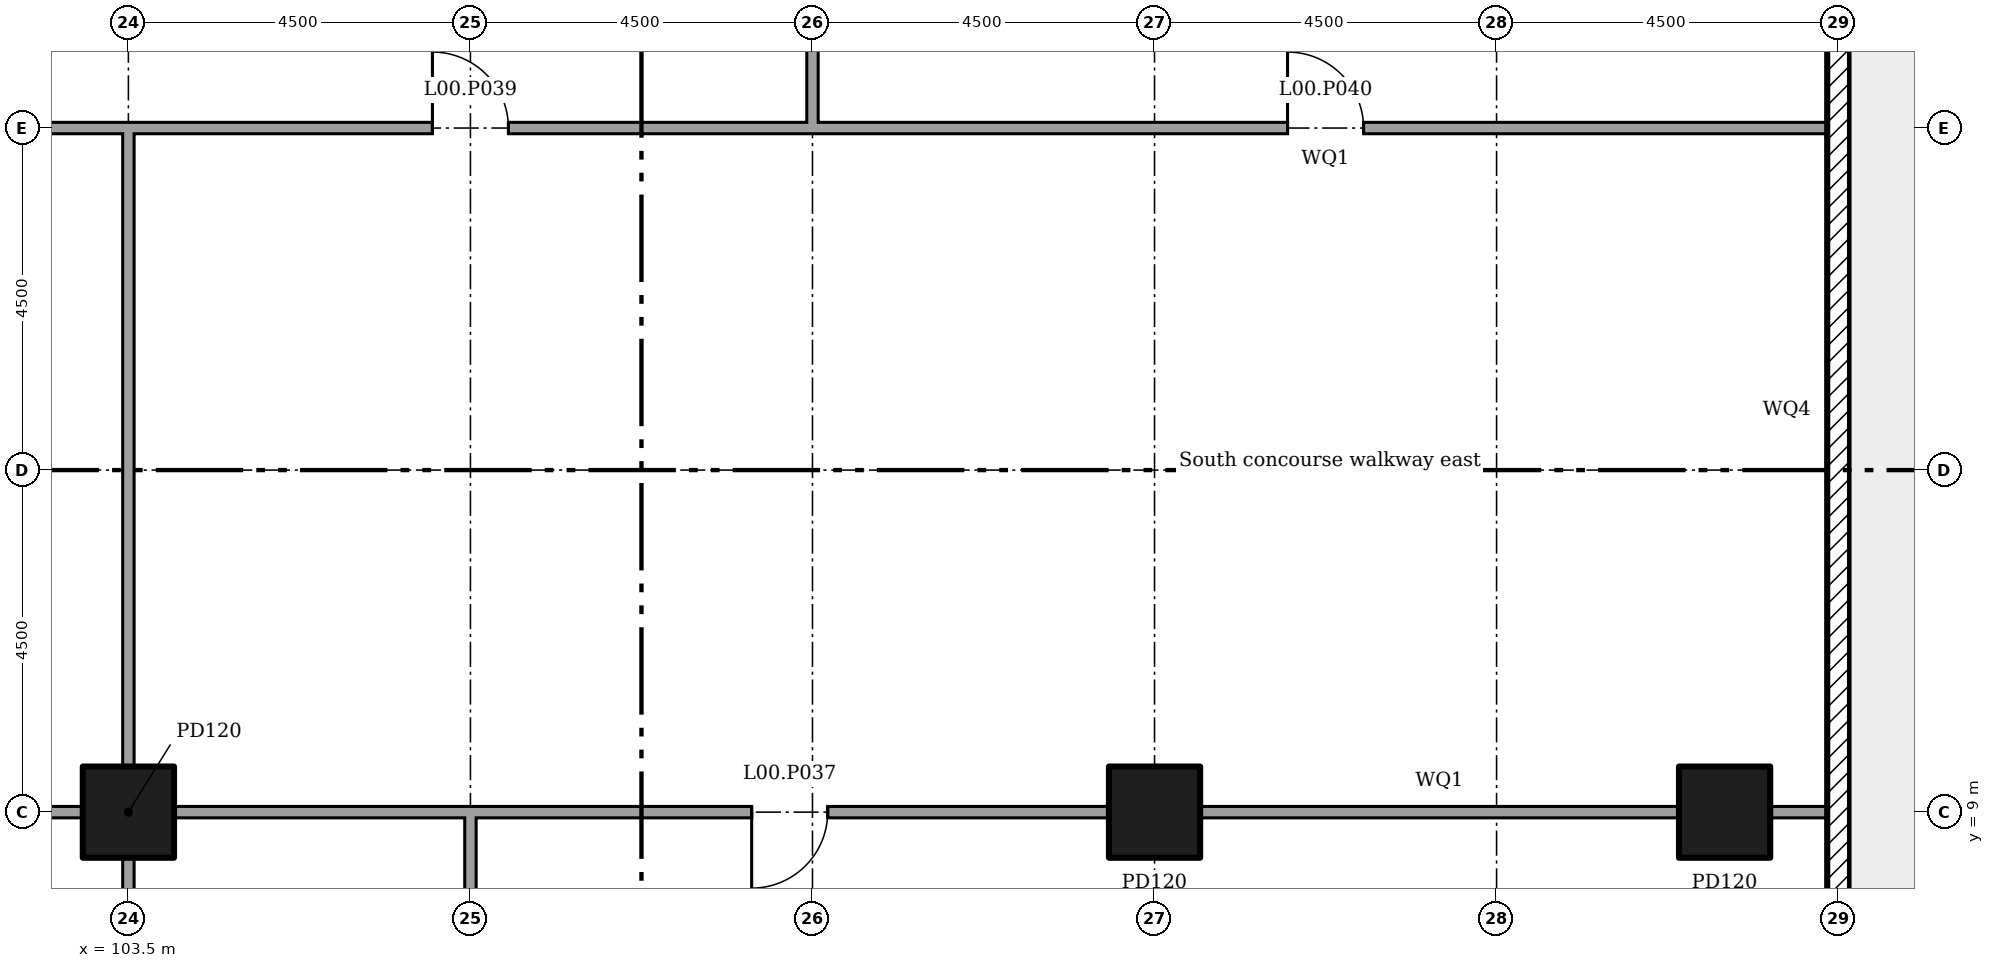
"""IFC4 building model, lengths in metres.
Left out: names, types, materials, properties, quantities, classifications, styles, units other than length and angle.
Written with IfcOpenShell. Run it as: python <this file> out.ifc"""

import sys

from ifc_helpers import new_model, si_unit, direction, frame, frame_2d, origin, origin_2d, place, context, subcontext, project, spatial, rectangle, extrude, element, fill, save


model = new_model("IFC4")
c1 = context("Model", 3, precision=1e-05, world=origin(), true_north=direction((0.0, 1.0)))
c2 = subcontext(c1, "Body", "Model", "MODEL_VIEW")
j1 = project(units=[si_unit("LENGTHUNIT", "METRE"), si_unit("PLANEANGLEUNIT", "RADIAN")], contexts=[c1])
p1 = place(None, origin())
s1 = spatial("IfcSite", under=j1, at=p1, CompositionType="ELEMENT")
p2 = place(p1, origin())
s2 = spatial("IfcBuilding", under=s1, at=p2, CompositionType="ELEMENT")
p3 = place(p2, origin())
s3 = spatial("IfcBuildingStorey", under=s2, at=p3, CompositionType="ELEMENT", Elevation=0.0)
for number, where in (
    (1, (103.5, 9.0, 0.0)),
    (2, (117.0, 9.0, 0.0)),
    (3, (124.5, 9.0, 0.0)),
):
    element("IfcColumn", number, at=place(p3, frame(where)), inside=s3, PredefinedType="COLUMN", context=c2, shape_type="SweptSolid", body=[
        extrude(rectangle(XDim=1.2, YDim=1.2, at=origin_2d()), origin(), (0.0, 0.0, 1.0), 6.0),
    ])
p4 = place(p3, frame((103.5, 0.595, 0.0), z_axis=(0.0, 0.0, 1.0), x_axis=(0.0, 1.0, 0.0)))
e4 = element("IfcWall", 4, at=p4, inside=s3, PredefinedType="PARTITIONING", context=c2, shape_type="SweptSolid", body=[
    extrude(rectangle(XDim=7.81, YDim=0.15, at=frame_2d((3.905, 0.0))), origin(), (0.0, 0.0, 1.0), 5.55),
])
p5 = place(p4, frame((3.4, 0.0, 0.0)))
e5 = element("IfcOpeningElement", 5, at=p5, cuts=e4, PredefinedType="OPENING", context=c2, shape_type="SweptSolid", body=[
    extrude(rectangle(XDim=1.0, YDim=2.1, at=frame_2d((0.5, 1.05))), frame((0.0, 0.085, 0.0), z_axis=(0.0, -1.0, 0.0), x_axis=(1.0, 0.0, 0.0)), (0.0, 0.0, 1.0), 0.17),
])
p6 = place(p3, frame((94.575, 9.0, 0.0)))
e6 = element("IfcWall", 6, at=p6, inside=s3, PredefinedType="PARTITIONING", context=c2, shape_type="SweptSolid", body=[
    extrude(rectangle(XDim=8.33, YDim=0.15, at=frame_2d((4.165, 0.0))), origin(), (0.0, 0.0, 1.0), 5.55),
])
p7 = place(p3, frame((108.0, 0.3, 0.0), z_axis=(0.0, 0.0, 1.0), x_axis=(0.0, 1.0, 0.0)))
e7 = element("IfcWall", 7, at=p7, inside=s3, PredefinedType="PARTITIONING", context=c2, shape_type="SweptSolid", body=[
    extrude(rectangle(XDim=8.775, YDim=0.15, at=frame_2d((4.387, 0.0))), origin(), (0.0, 0.0, 1.0), 5.55),
])
p8 = place(p3, frame((104.095, 9.0, 0.0)))
e8 = element("IfcWall", 8, at=p8, inside=s3, PredefinedType="PARTITIONING", context=c2, shape_type="SweptSolid", body=[
    extrude(rectangle(XDim=3.83, YDim=0.15, at=frame_2d((1.915, 0.0))), origin(), (0.0, 0.0, 1.0), 5.55),
])
p9 = place(p3, frame((108.0, 9.0, 0.0)))
e9 = element("IfcWall", 9, at=p9, inside=s3, PredefinedType="PARTITIONING", context=c2, shape_type="SweptSolid", body=[
    extrude(rectangle(XDim=8.405, YDim=0.15, at=frame_2d((4.203, 0.0))), origin(), (0.0, 0.0, 1.0), 5.55),
])
p10 = place(p9, frame((3.7, 0.0, 0.0)))
e10 = element("IfcOpeningElement", 10, at=p10, cuts=e9, PredefinedType="OPENING", context=c2, shape_type="SweptSolid", body=[
    extrude(rectangle(XDim=1.0, YDim=2.1, at=frame_2d((0.5, 1.05))), frame((0.0, 0.085, 0.0), z_axis=(0.0, -1.0, 0.0), x_axis=(1.0, 0.0, 0.0)), (0.0, 0.0, 1.0), 0.17),
])
p11 = place(p3, frame((117.595, 9.0, 0.0)))
e11 = element("IfcWall", 11, at=p11, inside=s3, PredefinedType="PARTITIONING", context=c2, shape_type="SweptSolid", body=[
    extrude(rectangle(XDim=6.31, YDim=0.15, at=frame_2d((3.155, 0.0))), origin(), (0.0, 0.0, 1.0), 5.55),
])
p12 = place(p3, frame((125.095, 9.0, 0.0)))
e12 = element("IfcWall", 12, at=p12, inside=s3, PredefinedType="PARTITIONING", context=c2, shape_type="SweptSolid", body=[
    extrude(rectangle(XDim=0.905, YDim=0.15, at=frame_2d((0.453, 0.0))), origin(), (0.0, 0.0, 1.0), 5.55),
])
p13 = place(p3, frame((103.5, 9.595, 0.0), z_axis=(0.0, 0.0, 1.0), x_axis=(0.0, 1.0, 0.0)))
e13 = element("IfcWall", 13, at=p13, inside=s3, PredefinedType="PARTITIONING", context=c2, shape_type="SweptSolid", body=[
    extrude(rectangle(XDim=8.48, YDim=0.15, at=frame_2d((4.24, 0.0))), origin(), (0.0, 0.0, 1.0), 5.55),
])
p14 = place(p3, frame((94.575, 18.0, 0.0)))
e14 = element("IfcWall", 14, at=p14, inside=s3, PredefinedType="PARTITIONING", context=c2, shape_type="SweptSolid", body=[
    extrude(rectangle(XDim=8.85, YDim=0.15, at=frame_2d((4.425, 0.0))), origin(), (0.0, 0.0, 1.0), 5.55),
])
p15 = place(p3, frame((103.5, 18.0, 0.0)))
e15 = element("IfcWall", 15, at=p15, inside=s3, PredefinedType="PARTITIONING", context=c2, shape_type="SweptSolid", body=[
    extrude(rectangle(XDim=9.075, YDim=0.15, at=frame_2d((4.538, 0.0))), origin(), (0.0, 0.0, 1.0), 5.55),
])
p16 = place(p15, frame((4.0, 0.0, 0.0)))
e16 = element("IfcOpeningElement", 16, at=p16, cuts=e15, PredefinedType="OPENING", context=c2, shape_type="SweptSolid", body=[
    extrude(rectangle(XDim=1.0, YDim=2.1, at=frame_2d((0.5, 1.05))), frame((0.0, 0.085, 0.0), z_axis=(0.0, -1.0, 0.0), x_axis=(1.0, 0.0, 0.0)), (0.0, 0.0, 1.0), 0.17),
])
p17 = place(p3, frame((112.5, 18.0, 0.0)))
e17 = element("IfcWall", 17, at=p17, inside=s3, PredefinedType="PARTITIONING", context=c2, shape_type="SweptSolid", body=[
    extrude(rectangle(XDim=13.5, YDim=0.15, at=frame_2d((6.75, 0.0))), origin(), (0.0, 0.0, 1.0), 5.55),
])
p18 = place(p17, frame((6.25, 0.0, 0.0)))
e18 = element("IfcOpeningElement", 18, at=p18, cuts=e17, PredefinedType="OPENING", context=c2, shape_type="SweptSolid", body=[
    extrude(rectangle(XDim=1.0, YDim=2.1, at=frame_2d((0.5, 1.05))), frame((0.0, 0.085, 0.0), z_axis=(0.0, -1.0, 0.0), x_axis=(1.0, 0.0, 0.0)), (0.0, 0.0, 1.0), 0.17),
])
p19 = place(p3, frame((112.5, 18.075, 0.0), z_axis=(0.0, 0.0, 1.0), x_axis=(0.0, 1.0, 0.0)))
e19 = element("IfcWall", 19, at=p19, inside=s3, PredefinedType="PARTITIONING", context=c2, shape_type="SweptSolid", body=[
    extrude(rectangle(XDim=7.93, YDim=0.15, at=frame_2d((3.965, 0.0))), origin(), (0.0, 0.0, 1.0), 5.55),
])
p20 = place(p3, frame((126.0, 1.5, 0.0), z_axis=(0.0, 0.0, 1.0), x_axis=(0.0, 1.0, 0.0)))
e20 = element("IfcWall", 20, at=p20, inside=s3, PredefinedType="SOLIDWALL", context=c2, shape_type="SweptSolid", body=[
    extrude(rectangle(XDim=25.575, YDim=0.3, at=frame_2d((12.788, 0.0))), origin(), (0.0, 0.0, 1.0), 1.1),
])
p21 = place(p10, frame((1.0, 0.0, 0.0), x_axis=(-1.0, 0.0, 0.0)))
e21 = element("IfcDoor", 21, at=p21, inside=s3, OperationType="SINGLE_SWING_LEFT", PredefinedType="DOOR", context=c2, shape_type="SweptSolid", body=[
    extrude(rectangle(XDim=1.0, YDim=2.1, at=frame_2d((0.5, 1.05))), frame((0.0, 0.025, 0.0), z_axis=(0.0, -1.0, 0.0), x_axis=(1.0, 0.0, 0.0)), (0.0, 0.0, 1.0), 0.05),
])
fill(e10, e21)
p22 = place(p16, origin())
e22 = element("IfcDoor", 22, at=p22, inside=s3, OperationType="SINGLE_SWING_RIGHT", PredefinedType="DOOR", context=c2, shape_type="SweptSolid", body=[
    extrude(rectangle(XDim=1.0, YDim=2.1, at=frame_2d((0.5, 1.05))), frame((0.0, 0.025, 0.0), z_axis=(0.0, -1.0, 0.0), x_axis=(1.0, 0.0, 0.0)), (0.0, 0.0, 1.0), 0.05),
])
fill(e16, e22)
p23 = place(p18, origin())
e23 = element("IfcDoor", 23, at=p23, inside=s3, OperationType="SINGLE_SWING_RIGHT", PredefinedType="DOOR", context=c2, shape_type="SweptSolid", body=[
    extrude(rectangle(XDim=1.0, YDim=2.1, at=frame_2d((0.5, 1.05))), frame((0.0, 0.025, 0.0), z_axis=(0.0, -1.0, 0.0), x_axis=(1.0, 0.0, 0.0)), (0.0, 0.0, 1.0), 0.05),
])
fill(e18, e23)
save(model, sys.argv[1])
